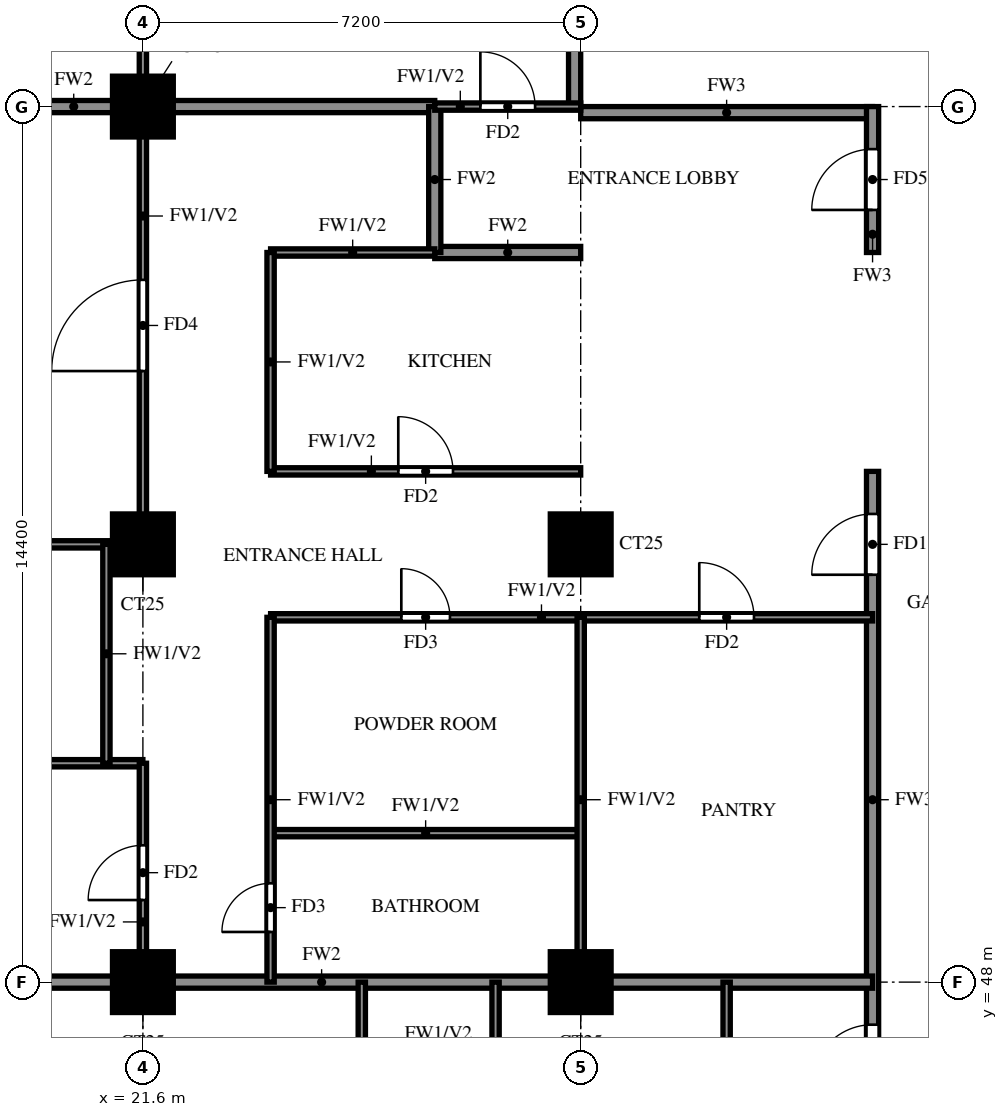
"""IFC4 building model, lengths in metres.
Left out: names, types, materials, properties, quantities, classifications, styles, units other than length and angle.
Written with IfcOpenShell. Run it as: python <this file> out.ifc"""

import sys

from ifc_helpers import new_model, si_unit, direction, frame, frame_2d, origin, origin_2d, place, context, subcontext, project, spatial, rectangle, extrude, source, transform, mapped, element, fill, save


model = new_model("IFC4")
c1 = context("Model", 3, precision=1e-05, world=origin(), true_north=direction((0.0, 1.0)))
c2 = subcontext(c1, "Body", "Model", "MODEL_VIEW")
j1 = project(units=[si_unit("LENGTHUNIT", "METRE"), si_unit("PLANEANGLEUNIT", "RADIAN")], contexts=[c1])
p1 = place(None, origin())
s1 = spatial("IfcSite", under=j1, at=p1, CompositionType="ELEMENT")
p2 = place(p1, origin())
s2 = spatial("IfcBuilding", under=s1, at=p2, CompositionType="ELEMENT")
p3 = place(p2, frame((0.0, 0.0, 164.0)))
s3 = spatial("IfcBuildingStorey", under=s2, at=p3, CompositionType="ELEMENT", Elevation=164.0)
m1 = source(origin(), c2, "Body", "SweptSolid", [
    extrude(rectangle(XDim=1.0, YDim=1.0, at=origin_2d()), origin(), (0.0, 0.0, 1.0), 3.2),
])
for number, where, z_axis, x_axis in (
    (1, (21.6, 48.0, 0.0), (0.0, 0.0, 1.0), (1.0, 0.0, 0.0)),
    (2, (28.8, 48.0, 0.0), (0.0, 0.0, 1.0), (1.0, 0.0, 0.0)),
    (3, (21.6, 55.2, 0.0), (0.0, 0.0, 1.0), (1.0, 0.0, 0.0)),
    (4, (28.8, 55.2, 0.0), (0.0, 0.0, 1.0), (1.0, 0.0, 0.0)),
    (5, (21.6, 62.4, 0.0), (0.0, 0.0, 1.0), (1.0, 0.0, 0.0)),
):
    element("IfcColumn", number, at=place(p3, frame(where, z_axis=z_axis, x_axis=x_axis)), inside=s3, PredefinedType="COLUMN", context=c2, shape_type="MappedRepresentation", body=[
        mapped(m1, transform((0.0, 0.0, 0.0))),
    ])
p4 = place(p3, frame((28.8, 62.3, 0.0), z_axis=(0.0, 0.0, 1.0), x_axis=(1.0, 0.0, 0.0)))
e6 = element("IfcWall", 6, at=p4, inside=s3, PredefinedType="SOLIDWALL", context=c2, shape_type="SweptSolid", body=[
    extrude(rectangle(XDim=4.8, YDim=0.2, at=frame_2d((2.4, 0.0))), origin(), (0.0, 0.0, 1.0), 3.2),
])
p5 = place(p3, frame((28.7, 62.4, 0.0), z_axis=(0.0, 0.0, 1.0), x_axis=(0.0, 1.0, 0.0)))
e7 = element("IfcWall", 7, at=p5, inside=s3, PredefinedType="SOLIDWALL", context=c2, shape_type="SweptSolid", body=[
    extrude(rectangle(XDim=15.6, YDim=0.2, at=frame_2d((7.8, 0.0))), origin(), (0.0, 0.0, 1.0), 3.2),
])
p6 = place(p3, frame((33.6, 45.6, 0.0), z_axis=(0.0, 0.0, 1.0), x_axis=(0.0, 1.0, 0.0)))
e8 = element("IfcWall", 8, at=p6, inside=s3, PredefinedType="SOLIDWALL", context=c2, shape_type="SweptSolid", body=[
    extrude(rectangle(XDim=10.8, YDim=0.2, at=frame_2d((5.4, 0.0))), origin(), (0.0, 0.0, 1.0), 3.2),
])
p7 = place(p6, frame((0.7, 0.0, 0.0)))
e9 = element("IfcOpeningElement", 9, at=p7, cuts=e8, PredefinedType="OPENING", context=c2, shape_type="SweptSolid", body=[
    extrude(rectangle(XDim=1.0, YDim=2.1, at=frame_2d((0.5, 1.05))), frame((0.0, 0.11, 0.0), z_axis=(0.0, -1.0, 0.0), x_axis=(1.0, 0.0, 0.0)), (0.0, 0.0, 1.0), 0.22),
])
p8 = place(p6, frame((9.1, 0.0, 0.0)))
e10 = element("IfcOpeningElement", 10, at=p8, cuts=e8, PredefinedType="OPENING", context=c2, shape_type="SweptSolid", body=[
    extrude(rectangle(XDim=1.0, YDim=2.1, at=frame_2d((0.5, 1.05))), frame((0.0, 0.11, 0.0), z_axis=(0.0, -1.0, 0.0), x_axis=(1.0, 0.0, 0.0)), (0.0, 0.0, 1.0), 0.22),
])
p9 = place(p3, frame((33.6, 60.0, 0.0), z_axis=(0.0, 0.0, 1.0), x_axis=(0.0, 1.0, 0.0)))
e11 = element("IfcWall", 11, at=p9, inside=s3, PredefinedType="SOLIDWALL", context=c2, shape_type="SweptSolid", body=[
    extrude(rectangle(XDim=2.4, YDim=0.2, at=frame_2d((1.2, 0.0))), origin(), (0.0, 0.0, 1.0), 3.2),
])
p10 = place(p9, frame((0.7, 0.0, 0.0)))
e12 = element("IfcOpeningElement", 12, at=p10, cuts=e11, PredefinedType="OPENING", context=c2, shape_type="SweptSolid", body=[
    extrude(rectangle(XDim=1.0, YDim=2.1, at=frame_2d((0.5, 1.05))), frame((0.0, 0.11, 0.0), z_axis=(0.0, -1.0, 0.0), x_axis=(1.0, 0.0, 0.0)), (0.0, 0.0, 1.0), 0.22),
])
p11 = place(p3, frame((14.525, 48.0, 0.0), z_axis=(0.0, 0.0, 1.0), x_axis=(1.0, 0.0, 0.0)))
e13 = element("IfcWall", 13, at=p11, inside=s3, PredefinedType="SOLIDWALL", context=c2, shape_type="SweptSolid", body=[
    extrude(rectangle(XDim=19.075, YDim=0.2, at=frame_2d((9.538, 0.0))), origin(), (0.0, 0.0, 1.0), 3.2),
])
p12 = place(p3, frame((26.4, 60.0, 0.0), z_axis=(0.0, 0.0, 1.0), x_axis=(1.0, 0.0, 0.0)))
e14 = element("IfcWall", 14, at=p12, inside=s3, PredefinedType="SOLIDWALL", context=c2, shape_type="SweptSolid", body=[
    extrude(rectangle(XDim=2.4, YDim=0.2, at=frame_2d((1.2, 0.0))), origin(), (0.0, 0.0, 1.0), 3.2),
])
p13 = place(p3, frame((14.525, 62.4, 0.0), z_axis=(0.0, 0.0, 1.0), x_axis=(1.0, 0.0, 0.0)))
e15 = element("IfcWall", 15, at=p13, inside=s3, PredefinedType="SOLIDWALL", context=c2, shape_type="SweptSolid", body=[
    extrude(rectangle(XDim=11.875, YDim=0.2, at=frame_2d((5.938, 0.0))), origin(), (0.0, 0.0, 1.0), 3.2),
])
p14 = place(p3, frame((26.4, 60.0, 0.0), z_axis=(0.0, 0.0, 1.0), x_axis=(0.0, 1.0, 0.0)))
e16 = element("IfcWall", 16, at=p14, inside=s3, PredefinedType="SOLIDWALL", context=c2, shape_type="SweptSolid", body=[
    extrude(rectangle(XDim=2.4, YDim=0.2, at=frame_2d((1.2, 0.0))), origin(), (0.0, 0.0, 1.0), 3.2),
])
p15 = place(p3, frame((23.7, 50.45, 0.0), z_axis=(0.0, 0.0, 1.0), x_axis=(1.0, 0.0, 0.0)))
e17 = element("IfcWall", 17, at=p15, inside=s3, PredefinedType="PARTITIONING", context=c2, shape_type="SweptSolid", body=[
    extrude(rectangle(XDim=5.1, YDim=0.12, at=frame_2d((2.55, 0.0))), origin(), (0.0, 0.0, 1.0), 3.2),
])
p16 = place(p3, frame((14.525, 51.6, 0.0), z_axis=(0.0, 0.0, 1.0), x_axis=(1.0, 0.0, 0.0)))
e18 = element("IfcWall", 18, at=p16, inside=s3, PredefinedType="PARTITIONING", context=c2, shape_type="SweptSolid", body=[
    extrude(rectangle(XDim=7.075, YDim=0.12, at=frame_2d((3.538, 0.0))), origin(), (0.0, 0.0, 1.0), 2.3),
])
p17 = place(p16, frame((2.837, 0.0, 0.0)))
e19 = element("IfcOpeningElement", 19, at=p17, cuts=e18, PredefinedType="OPENING", context=c2, shape_type="SweptSolid", body=[
    extrude(rectangle(XDim=0.8, YDim=2.1, at=frame_2d((0.4, 1.05))), frame((0.0, 0.07, 0.0), z_axis=(0.0, -1.0, 0.0), x_axis=(1.0, 0.0, 0.0)), (0.0, 0.0, 1.0), 0.14),
])
p18 = place(p3, frame((23.7, 54.0, 0.0), z_axis=(0.0, 0.0, 1.0), x_axis=(1.0, 0.0, 0.0)))
e20 = element("IfcWall", 20, at=p18, inside=s3, PredefinedType="PARTITIONING", context=c2, shape_type="SweptSolid", body=[
    extrude(rectangle(XDim=9.9, YDim=0.12, at=frame_2d((4.95, 0.0))), origin(), (0.0, 0.0, 1.0), 3.2),
])
p19 = place(p18, frame((2.15, 0.0, 0.0)))
e21 = element("IfcOpeningElement", 21, at=p19, cuts=e20, PredefinedType="OPENING", context=c2, shape_type="SweptSolid", body=[
    extrude(rectangle(XDim=0.8, YDim=2.1, at=frame_2d((0.4, 1.05))), frame((0.0, 0.07, 0.0), z_axis=(0.0, -1.0, 0.0), x_axis=(1.0, 0.0, 0.0)), (0.0, 0.0, 1.0), 0.14),
])
p20 = place(p18, frame((7.05, 0.0, 0.0)))
e22 = element("IfcOpeningElement", 22, at=p20, cuts=e20, PredefinedType="OPENING", context=c2, shape_type="SweptSolid", body=[
    extrude(rectangle(XDim=0.9, YDim=2.1, at=frame_2d((0.45, 1.05))), frame((0.0, 0.07, 0.0), z_axis=(0.0, -1.0, 0.0), x_axis=(1.0, 0.0, 0.0)), (0.0, 0.0, 1.0), 0.14),
])
p21 = place(p3, frame((14.525, 55.2, 0.0), z_axis=(0.0, 0.0, 1.0), x_axis=(1.0, 0.0, 0.0)))
e23 = element("IfcWall", 23, at=p21, inside=s3, PredefinedType="PARTITIONING", context=c2, shape_type="SweptSolid", body=[
    extrude(rectangle(XDim=7.075, YDim=0.12, at=frame_2d((3.538, 0.0))), origin(), (0.0, 0.0, 1.0), 3.2),
])
p22 = place(p3, frame((23.7, 56.4, 0.0), z_axis=(0.0, 0.0, 1.0), x_axis=(1.0, 0.0, 0.0)))
e24 = element("IfcWall", 24, at=p22, inside=s3, PredefinedType="PARTITIONING", context=c2, shape_type="SweptSolid", body=[
    extrude(rectangle(XDim=5.1, YDim=0.12, at=frame_2d((2.55, 0.0))), origin(), (0.0, 0.0, 1.0), 3.2),
])
p23 = place(p22, frame((2.1, 0.0, 0.0)))
e25 = element("IfcOpeningElement", 25, at=p23, cuts=e24, PredefinedType="OPENING", context=c2, shape_type="SweptSolid", body=[
    extrude(rectangle(XDim=0.9, YDim=2.1, at=frame_2d((0.45, 1.05))), frame((0.0, 0.07, 0.0), z_axis=(0.0, -1.0, 0.0), x_axis=(1.0, 0.0, 0.0)), (0.0, 0.0, 1.0), 0.14),
])
p24 = place(p3, frame((23.7, 60.0, 0.0), z_axis=(0.0, 0.0, 1.0), x_axis=(1.0, 0.0, 0.0)))
e26 = element("IfcWall", 26, at=p24, inside=s3, PredefinedType="PARTITIONING", context=c2, shape_type="SweptSolid", body=[
    extrude(rectangle(XDim=2.7, YDim=0.12, at=frame_2d((1.35, 0.0))), origin(), (0.0, 0.0, 1.0), 3.2),
])
p25 = place(p3, frame((26.4, 62.4, 0.0), z_axis=(0.0, 0.0, 1.0), x_axis=(1.0, 0.0, 0.0)))
e27 = element("IfcWall", 27, at=p25, inside=s3, PredefinedType="PARTITIONING", context=c2, shape_type="SweptSolid", body=[
    extrude(rectangle(XDim=2.4, YDim=0.12, at=frame_2d((1.2, 0.0))), origin(), (0.0, 0.0, 1.0), 3.2),
])
p26 = place(p25, frame((0.75, 0.0, 0.0)))
e28 = element("IfcOpeningElement", 28, at=p26, cuts=e27, PredefinedType="OPENING", context=c2, shape_type="SweptSolid", body=[
    extrude(rectangle(XDim=0.9, YDim=2.1, at=frame_2d((0.45, 1.05))), frame((0.0, 0.07, 0.0), z_axis=(0.0, -1.0, 0.0), x_axis=(1.0, 0.0, 0.0)), (0.0, 0.0, 1.0), 0.14),
])
p27 = place(p3, frame((21.0, 51.6, 0.0), z_axis=(0.0, 0.0, 1.0), x_axis=(0.0, 1.0, 0.0)))
e29 = element("IfcWall", 29, at=p27, inside=s3, PredefinedType="PARTITIONING", context=c2, shape_type="SweptSolid", body=[
    extrude(rectangle(XDim=3.6, YDim=0.12, at=frame_2d((1.8, 0.0))), origin(), (0.0, 0.0, 1.0), 3.2),
])
p28 = place(p3, frame((21.6, 48.0, 0.0), z_axis=(0.0, 0.0, 1.0), x_axis=(0.0, 1.0, 0.0)))
e30 = element("IfcWall", 30, at=p28, inside=s3, PredefinedType="PARTITIONING", context=c2, shape_type="SweptSolid", body=[
    extrude(rectangle(XDim=3.6, YDim=0.12, at=frame_2d((1.8, 0.0))), origin(), (0.0, 0.0, 1.0), 3.2),
])
p29 = place(p28, frame((1.35, 0.0, 0.0)))
e31 = element("IfcOpeningElement", 31, at=p29, cuts=e30, PredefinedType="OPENING", context=c2, shape_type="SweptSolid", body=[
    extrude(rectangle(XDim=0.9, YDim=2.1, at=frame_2d((0.45, 1.05))), frame((0.0, 0.07, 0.0), z_axis=(0.0, -1.0, 0.0), x_axis=(1.0, 0.0, 0.0)), (0.0, 0.0, 1.0), 0.14),
])
p30 = place(p3, frame((21.6, 55.2, 0.0), z_axis=(0.0, 0.0, 1.0), x_axis=(0.0, 1.0, 0.0)))
e32 = element("IfcWall", 32, at=p30, inside=s3, PredefinedType="PARTITIONING", context=c2, shape_type="SweptSolid", body=[
    extrude(rectangle(XDim=10.8, YDim=0.12, at=frame_2d((5.4, 0.0))), origin(), (0.0, 0.0, 1.0), 3.2),
])
p31 = place(p30, frame((2.85, 0.0, 0.0)))
e33 = element("IfcOpeningElement", 33, at=p31, cuts=e32, PredefinedType="OPENING", context=c2, shape_type="SweptSolid", body=[
    extrude(rectangle(XDim=1.5, YDim=2.1, at=frame_2d((0.75, 1.05))), frame((0.0, 0.07, 0.0), z_axis=(0.0, -1.0, 0.0), x_axis=(1.0, 0.0, 0.0)), (0.0, 0.0, 1.0), 0.14),
])
p32 = place(p30, frame((8.55, 0.0, 0.0)))
e34 = element("IfcOpeningElement", 34, at=p32, cuts=e32, PredefinedType="OPENING", context=c2, shape_type="SweptSolid", body=[
    extrude(rectangle(XDim=0.9, YDim=2.1, at=frame_2d((0.45, 1.05))), frame((0.0, 0.07, 0.0), z_axis=(0.0, -1.0, 0.0), x_axis=(1.0, 0.0, 0.0)), (0.0, 0.0, 1.0), 0.14),
])
p33 = place(p3, frame((23.7, 48.0, 0.0), z_axis=(0.0, 0.0, 1.0), x_axis=(0.0, 1.0, 0.0)))
e35 = element("IfcWall", 35, at=p33, inside=s3, PredefinedType="PARTITIONING", context=c2, shape_type="SweptSolid", body=[
    extrude(rectangle(XDim=6.0, YDim=0.12, at=frame_2d((3.0, 0.0))), origin(), (0.0, 0.0, 1.0), 3.2),
])
p34 = place(p33, frame((0.825, 0.0, 0.0)))
e36 = element("IfcOpeningElement", 36, at=p34, cuts=e35, PredefinedType="OPENING", context=c2, shape_type="SweptSolid", body=[
    extrude(rectangle(XDim=0.8, YDim=2.1, at=frame_2d((0.4, 1.05))), frame((0.0, 0.07, 0.0), z_axis=(0.0, -1.0, 0.0), x_axis=(1.0, 0.0, 0.0)), (0.0, 0.0, 1.0), 0.14),
])
p35 = place(p3, frame((23.7, 56.4, 0.0), z_axis=(0.0, 0.0, 1.0), x_axis=(0.0, 1.0, 0.0)))
e37 = element("IfcWall", 37, at=p35, inside=s3, PredefinedType="PARTITIONING", context=c2, shape_type="SweptSolid", body=[
    extrude(rectangle(XDim=3.6, YDim=0.12, at=frame_2d((1.8, 0.0))), origin(), (0.0, 0.0, 1.0), 3.2),
])
p36 = place(p3, frame((25.2, 39.725, 0.0), z_axis=(0.0, 0.0, 1.0), x_axis=(0.0, 1.0, 0.0)))
e38 = element("IfcWall", 38, at=p36, inside=s3, PredefinedType="PARTITIONING", context=c2, shape_type="SweptSolid", body=[
    extrude(rectangle(XDim=8.275, YDim=0.12, at=frame_2d((4.137, 0.0))), origin(), (0.0, 0.0, 1.0), 3.2),
])
p37 = place(p36, frame((4.525, 0.0, 0.0)))
e39 = element("IfcOpeningElement", 39, at=p37, cuts=e38, PredefinedType="OPENING", context=c2, shape_type="SweptSolid", body=[
    extrude(rectangle(XDim=0.9, YDim=2.1, at=frame_2d((0.45, 1.05))), frame((0.0, 0.07, 0.0), z_axis=(0.0, -1.0, 0.0), x_axis=(1.0, 0.0, 0.0)), (0.0, 0.0, 1.0), 0.14),
])
p38 = place(p3, frame((27.4, 45.6, 0.0), z_axis=(0.0, 0.0, 1.0), x_axis=(0.0, 1.0, 0.0)))
e40 = element("IfcWall", 40, at=p38, inside=s3, PredefinedType="PARTITIONING", context=c2, shape_type="SweptSolid", body=[
    extrude(rectangle(XDim=2.4, YDim=0.12, at=frame_2d((1.2, 0.0))), origin(), (0.0, 0.0, 1.0), 3.2),
])
p39 = place(p3, frame((28.8, 48.0, 0.0), z_axis=(0.0, 0.0, 1.0), x_axis=(0.0, 1.0, 0.0)))
e41 = element("IfcWall", 41, at=p39, inside=s3, PredefinedType="PARTITIONING", context=c2, shape_type="SweptSolid", body=[
    extrude(rectangle(XDim=6.0, YDim=0.12, at=frame_2d((3.0, 0.0))), origin(), (0.0, 0.0, 1.0), 3.2),
])
p40 = place(p3, frame((31.2, 45.6, 0.0), z_axis=(0.0, 0.0, 1.0), x_axis=(0.0, 1.0, 0.0)))
e42 = element("IfcWall", 42, at=p40, inside=s3, PredefinedType="PARTITIONING", context=c2, shape_type="SweptSolid", body=[
    extrude(rectangle(XDim=2.4, YDim=0.12, at=frame_2d((1.2, 0.0))), origin(), (0.0, 0.0, 1.0), 3.2),
])
p41 = place(p7, origin())
e43 = element("IfcDoor", 43, at=p41, inside=s3, OperationType="SINGLE_SWING_LEFT", PredefinedType="DOOR", context=c2, shape_type="SweptSolid", body=[
    extrude(rectangle(XDim=1.0, YDim=2.1, at=frame_2d((0.5, 1.05))), frame((0.0, 0.025, 0.0), z_axis=(0.0, -1.0, 0.0), x_axis=(1.0, 0.0, 0.0)), (0.0, 0.0, 1.0), 0.05),
])
fill(e9, e43)
p42 = place(p8, origin())
e44 = element("IfcDoor", 44, at=p42, inside=s3, OperationType="SINGLE_SWING_LEFT", PredefinedType="DOOR", context=c2, shape_type="SweptSolid", body=[
    extrude(rectangle(XDim=1.0, YDim=2.1, at=frame_2d((0.5, 1.05))), frame((0.0, 0.025, 0.0), z_axis=(0.0, -1.0, 0.0), x_axis=(1.0, 0.0, 0.0)), (0.0, 0.0, 1.0), 0.05),
])
fill(e10, e44)
p43 = place(p29, origin())
e45 = element("IfcDoor", 45, at=p43, inside=s3, OperationType="SINGLE_SWING_RIGHT", PredefinedType="DOOR", context=c2, shape_type="SweptSolid", body=[
    extrude(rectangle(XDim=0.9, YDim=2.1, at=frame_2d((0.45, 1.05))), frame((0.0, 0.025, 0.0), z_axis=(0.0, -1.0, 0.0), x_axis=(1.0, 0.0, 0.0)), (0.0, 0.0, 1.0), 0.05),
])
fill(e31, e45)
p44 = place(p31, origin())
e46 = element("IfcDoor", 46, at=p44, inside=s3, OperationType="SINGLE_SWING_LEFT", PredefinedType="DOOR", context=c2, shape_type="SweptSolid", body=[
    extrude(rectangle(XDim=1.5, YDim=2.1, at=frame_2d((0.75, 1.05))), frame((0.0, 0.025, 0.0), z_axis=(0.0, -1.0, 0.0), x_axis=(1.0, 0.0, 0.0)), (0.0, 0.0, 1.0), 0.05),
])
fill(e33, e46)
p45 = place(p34, origin())
e47 = element("IfcDoor", 47, at=p45, inside=s3, OperationType="SINGLE_SWING_RIGHT", PredefinedType="DOOR", context=c2, shape_type="SweptSolid", body=[
    extrude(rectangle(XDim=0.8, YDim=2.1, at=frame_2d((0.4, 1.05))), frame((0.0, 0.025, 0.0), z_axis=(0.0, -1.0, 0.0), x_axis=(1.0, 0.0, 0.0)), (0.0, 0.0, 1.0), 0.05),
])
fill(e36, e47)
p46 = place(p19, origin())
e48 = element("IfcDoor", 48, at=p46, inside=s3, OperationType="SINGLE_SWING_LEFT", PredefinedType="DOOR", context=c2, shape_type="SweptSolid", body=[
    extrude(rectangle(XDim=0.8, YDim=2.1, at=frame_2d((0.4, 1.05))), frame((0.0, 0.025, 0.0), z_axis=(0.0, -1.0, 0.0), x_axis=(1.0, 0.0, 0.0)), (0.0, 0.0, 1.0), 0.05),
])
fill(e21, e48)
p47 = place(p23, origin())
e49 = element("IfcDoor", 49, at=p47, inside=s3, OperationType="SINGLE_SWING_LEFT", PredefinedType="DOOR", context=c2, shape_type="SweptSolid", body=[
    extrude(rectangle(XDim=0.9, YDim=2.1, at=frame_2d((0.45, 1.05))), frame((0.0, 0.025, 0.0), z_axis=(0.0, -1.0, 0.0), x_axis=(1.0, 0.0, 0.0)), (0.0, 0.0, 1.0), 0.05),
])
fill(e25, e49)
p48 = place(p20, origin())
e50 = element("IfcDoor", 50, at=p48, inside=s3, OperationType="SINGLE_SWING_RIGHT", PredefinedType="DOOR", context=c2, shape_type="SweptSolid", body=[
    extrude(rectangle(XDim=0.9, YDim=2.1, at=frame_2d((0.45, 1.05))), frame((0.0, 0.025, 0.0), z_axis=(0.0, -1.0, 0.0), x_axis=(1.0, 0.0, 0.0)), (0.0, 0.0, 1.0), 0.05),
])
fill(e22, e50)
p49 = place(p26, origin())
e51 = element("IfcDoor", 51, at=p49, inside=s3, OperationType="SINGLE_SWING_LEFT", PredefinedType="DOOR", context=c2, shape_type="SweptSolid", body=[
    extrude(rectangle(XDim=0.9, YDim=2.1, at=frame_2d((0.45, 1.05))), frame((0.0, 0.025, 0.0), z_axis=(0.0, -1.0, 0.0), x_axis=(1.0, 0.0, 0.0)), (0.0, 0.0, 1.0), 0.05),
])
fill(e28, e51)
p50 = place(p10, origin())
e52 = element("IfcDoor", 52, at=p50, inside=s3, OperationType="SINGLE_SWING_LEFT", PredefinedType="DOOR", context=c2, shape_type="SweptSolid", body=[
    extrude(rectangle(XDim=1.0, YDim=2.1, at=frame_2d((0.5, 1.05))), frame((0.0, 0.025, 0.0), z_axis=(0.0, -1.0, 0.0), x_axis=(1.0, 0.0, 0.0)), (0.0, 0.0, 1.0), 0.05),
])
fill(e12, e52)
save(model, sys.argv[1])
